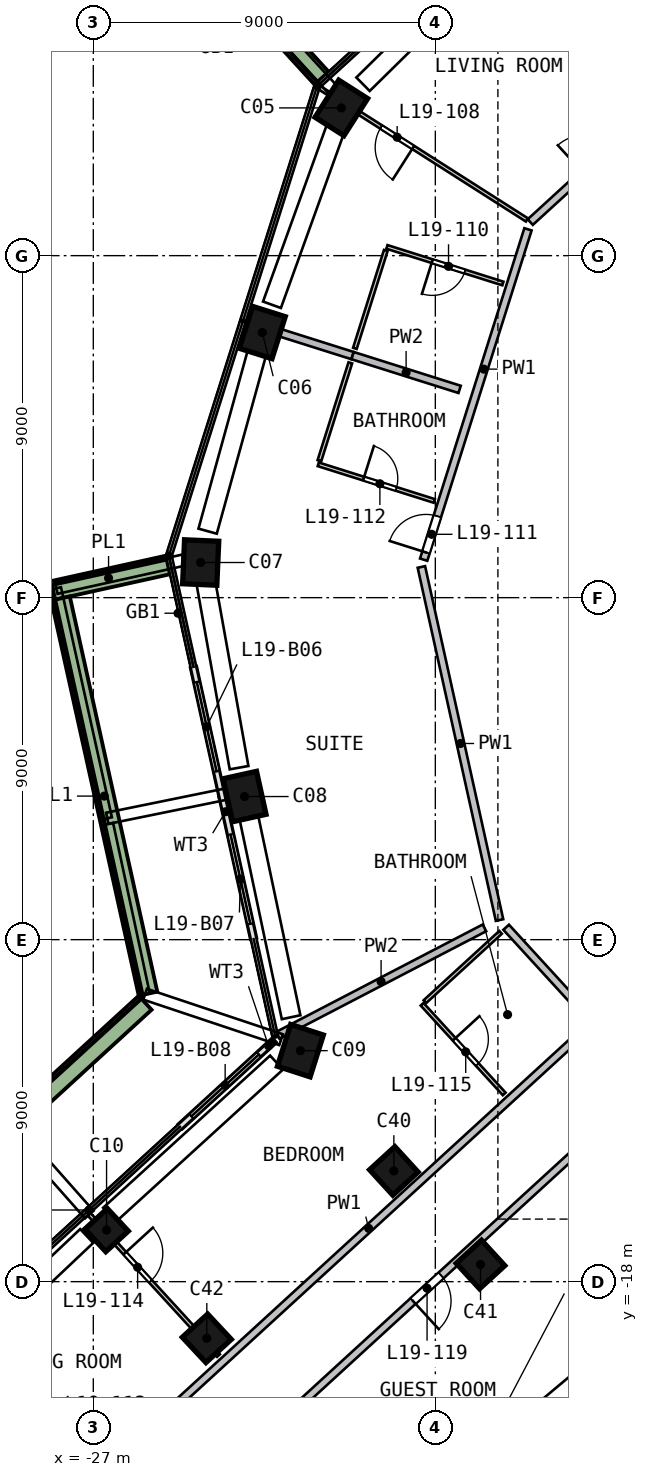
"""IFC4 building model, lengths in metres.
Left out: names, types, materials, properties, quantities, classifications, styles, units other than length and angle.
Written with IfcOpenShell. Run it as: python <this file> out.ifc"""

import sys

from ifc_helpers import new_model, si_unit, direction, frame, frame_2d, origin, origin_2d, place, context, subcontext, project, spatial, rectangle, extrude, element, fill, save


model = new_model("IFC4")
c1 = context("Model", 3, precision=1e-05, world=origin(), true_north=direction((0.0, 1.0)))
c2 = subcontext(c1, "Body", "Model", "MODEL_VIEW")
j1 = project(units=[si_unit("LENGTHUNIT", "METRE"), si_unit("PLANEANGLEUNIT", "RADIAN")], contexts=[c1])
p1 = place(None, origin())
s1 = spatial("IfcSite", under=j1, at=p1, CompositionType="ELEMENT")
p2 = place(p1, origin())
s2 = spatial("IfcBuilding", under=s1, at=p2, CompositionType="ELEMENT")
p3 = place(p2, frame((0.0, 0.0, 86.0)))
s3 = spatial("IfcBuildingStorey", under=s2, at=p3, CompositionType="ELEMENT", Elevation=86.0)
p4 = place(p3, frame((-20.399, 13.006, 0.0), z_axis=(-0.061048974, -0.097541511, 0.993357275), x_axis=(0.534139029, 0.837529173, 0.115066858)))
e1 = element("IfcColumn", 1, at=p4, inside=s3, PredefinedType="COLUMN", context=c2, shape_type="SweptSolid", body=[
    extrude(rectangle(XDim=1.15, YDim=0.9, at=origin_2d()), origin(), (0.0, 0.0, 1.0), 3.211),
])
p5 = place(p3, frame((-22.513, 7.107, 0.0), z_axis=(-0.032929748, -0.107382919, 0.99367225), x_axis=(-0.299377243, -0.947501295, -0.11231457)))
e2 = element("IfcColumn", 2, at=p5, inside=s3, PredefinedType="COLUMN", context=c2, shape_type="SweptSolid", body=[
    extrude(rectangle(XDim=1.15, YDim=0.9, at=origin_2d()), origin(), (0.0, 0.0, 1.0), 3.21),
])
p6 = place(p3, frame((-24.169, 1.064, 0.0), z_axis=(-0.004105432, -0.114952103, 0.993362552), x_axis=(0.043881327, 0.992393334, 0.115021301)))
e3 = element("IfcColumn", 3, at=p6, inside=s3, PredefinedType="COLUMN", context=c2, shape_type="SweptSolid", body=[
    extrude(rectangle(XDim=1.15, YDim=0.9, at=origin_2d()), origin(), (0.0, 0.0, 1.0), 3.211),
])
p7 = place(p3, frame((-23.051, -5.102, 0.0), z_axis=(0.025248696, -0.109436366, 0.993673078), x_axis=(0.215163997, -0.970098725, -0.112307249)))
e4 = element("IfcColumn", 4, at=p7, inside=s3, PredefinedType="COLUMN", context=c2, shape_type="SweptSolid", body=[
    extrude(rectangle(XDim=1.15, YDim=0.9, at=origin_2d()), origin(), (0.0, 0.0, 1.0), 3.21),
])
p8 = place(p3, frame((-21.62, -11.797, 0.0), z_axis=(0.056930104, -0.102306968, 0.993122474), x_axis=(0.306699912, 0.94842803, 0.080121376)))
e5 = element("IfcColumn", 5, at=p8, inside=s3, PredefinedType="COLUMN", context=c2, shape_type="SweptSolid", body=[
    extrude(rectangle(XDim=1.15, YDim=0.9, at=origin_2d()), origin(), (0.0, 0.0, 1.0), 3.212),
])
p9 = place(p3, frame((-26.812, -16.552, 0.0), z_axis=(0.133115788, -0.075331434, 0.988233455), x_axis=(-0.731940459, -0.679761124, 0.04677584)))
e6 = element("IfcColumn", 6, at=p9, inside=s3, PredefinedType="COLUMN", context=c2, shape_type="SweptSolid", body=[
    extrude(rectangle(XDim=0.8, YDim=0.8, at=origin_2d()), origin(), (0.0, 0.0, 1.0), 3.228),
])
for number, where, z_axis, x_axis in (
    (7, (-19.178, -14.976, 0.0), (0.072, -0.091, 0.993), (-0.738, -0.674, -0.008)),
    (8, (-16.912, -17.452, 0.0), (0.084, -0.08, 0.993), (-0.737, -0.676, 0.008)),
):
    element("IfcColumn", number, at=place(p3, frame(where, z_axis=z_axis, x_axis=x_axis)), inside=s3, PredefinedType="COLUMN", context=c2, shape_type="SweptSolid", body=[
        extrude(rectangle(XDim=0.9, YDim=0.9, at=origin_2d()), origin(), (0.0, 0.0, 1.0), 3.211),
    ])
p10 = place(p3, frame((-24.191, -19.415, 0.0), z_axis=(0.146355341, -0.062788481, 0.987237419), x_axis=(-0.729631569, -0.680756707, 0.064869702)))
e9 = element("IfcColumn", 9, at=p10, inside=s3, PredefinedType="COLUMN", context=c2, shape_type="SweptSolid", body=[
    extrude(rectangle(XDim=0.9, YDim=0.9, at=origin_2d()), origin(), (0.0, 0.0, 1.0), 3.231),
])
p11 = place(p3, frame((-24.363, -1.833, 0.0), z_axis=(0.0, 0.0, 1.0), x_axis=(0.216097265, -0.976371841, 0.0)))
e10 = element("IfcWall", 10, at=p11, inside=s3, PredefinedType="SOLIDWALL", context=c2, shape_type="SweptSolid", body=[
    extrude(rectangle(XDim=3.475, YDim=0.15, at=frame_2d((1.738, 0.0))), origin(), (0.0, 0.0, 1.0), 2.425),
])
p12 = place(p11, frame((0.4, 0.0, 0.0)))
e11 = element("IfcOpeningElement", 11, at=p12, cuts=e10, PredefinedType="OPENING", context=c2, shape_type="SweptSolid", body=[
    extrude(rectangle(XDim=2.4, YDim=2.4, at=frame_2d((1.2, 1.2))), frame((0.0, 0.085, 0.0), z_axis=(0.0, -1.0, 0.0), x_axis=(1.0, 0.0, 0.0)), (0.0, 0.0, 1.0), 0.17),
])
p13 = place(p3, frame((-23.612, -5.226, 0.0), z_axis=(0.0, 0.0, 1.0), x_axis=(0.216101395, -0.976370927, 0.0)))
e12 = element("IfcWall", 12, at=p13, inside=s3, PredefinedType="SOLIDWALL", context=c2, shape_type="SweptSolid", body=[
    extrude(rectangle(XDim=3.835, YDim=0.15, at=frame_2d((1.918, 0.0))), origin(), (0.0, 0.0, 1.0), 2.425),
])
p14 = place(p13, frame((1.035, 0.0, 0.0)))
e13 = element("IfcOpeningElement", 13, at=p14, cuts=e12, PredefinedType="OPENING", context=c2, shape_type="SweptSolid", body=[
    extrude(rectangle(XDim=2.4, YDim=2.4, at=frame_2d((1.2, 1.2))), frame((0.0, 0.085, 0.0), z_axis=(0.0, -1.0, 0.0), x_axis=(1.0, 0.0, 0.0)), (0.0, 0.0, 1.0), 0.17),
])
p15 = place(p3, frame((-22.281, -11.691, 0.0), z_axis=(0.0, 0.0, 1.0), x_axis=(-0.737483286, -0.675365385, 0.0)))
e14 = element("IfcWall", 14, at=p15, inside=s3, PredefinedType="SOLIDWALL", context=c2, shape_type="SweptSolid", body=[
    extrude(rectangle(XDim=3.293, YDim=0.15, at=frame_2d((1.647, 0.0))), origin(), (0.0, 0.0, 1.0), 2.425),
])
p16 = place(p15, frame((0.494, 0.0, 0.0)))
e15 = element("IfcOpeningElement", 15, at=p16, cuts=e14, PredefinedType="OPENING", context=c2, shape_type="SweptSolid", body=[
    extrude(rectangle(XDim=2.4, YDim=2.4, at=frame_2d((1.2, 1.2))), frame((0.0, 0.085, 0.0), z_axis=(0.0, -1.0, 0.0), x_axis=(1.0, 0.0, 0.0)), (0.0, 0.0, 1.0), 0.17),
])
p17 = place(p3, frame((-22.815, 15.661, 0.0), z_axis=(0.0, 0.0, 1.0), x_axis=(0.675257533, -0.737582039, 0.0)))
e16 = element("IfcWall", 16, at=p17, inside=s3, PredefinedType="SOLIDWALL", context=c2, shape_type="SweptSolid", body=[
    extrude(rectangle(XDim=2.699, YDim=0.5, at=frame_2d((1.35, 0.0))), origin(), (0.0, 0.0, 1.0), 0.7),
])
p18 = place(p3, frame((-25.037, 0.86, 0.0), z_axis=(0.0, 0.0, 1.0), x_axis=(-0.97638239, -0.216049597, 0.0)))
e17 = element("IfcWall", 17, at=p18, inside=s3, PredefinedType="SOLIDWALL", context=c2, shape_type="SweptSolid", body=[
    extrude(rectangle(XDim=3.199, YDim=0.5, at=frame_2d((1.6, 0.0))), origin(), (0.0, 0.0, 1.0), 0.7),
])
p19 = place(p3, frame((-27.862, -0.021, 0.0), z_axis=(0.0, 0.0, 1.0), x_axis=(0.216102871, -0.9763706, 0.0)))
e18 = element("IfcWall", 18, at=p19, inside=s3, PredefinedType="SOLIDWALL", context=c2, shape_type="SweptSolid", body=[
    extrude(rectangle(XDim=10.652, YDim=0.5, at=frame_2d((5.326, 0.0))), origin(), (0.0, 0.0, 1.0), 0.7),
])
p20 = place(p3, frame((-25.635, -10.661, 0.0), z_axis=(0.0, 0.0, 1.0), x_axis=(-0.737508785, -0.675337539, 0.0)))
e19 = element("IfcWall", 19, at=p20, inside=s3, PredefinedType="SOLIDWALL", context=c2, shape_type="SweptSolid", body=[
    extrude(rectangle(XDim=11.541, YDim=0.5, at=frame_2d((5.771, 0.0))), origin(), (0.0, 0.0, 1.0), 0.7),
])
p21 = place(p3, frame((-28.508, -24.613, 0.0), z_axis=(0.0, 0.0, 1.0), x_axis=(0.737515881, 0.67532979, 0.0)))
e20 = element("IfcWall", 20, at=p21, inside=s3, PredefinedType="SOLIDWALL", context=c2, shape_type="SweptSolid", body=[
    extrude(rectangle(XDim=19.689, YDim=0.2, at=frame_2d((9.844, 0.0))), origin(), (0.0, 0.0, 1.0), 3.19),
])
p22 = place(p21, frame((2.85, 0.0, 0.0)))
e21 = element("IfcOpeningElement", 21, at=p22, cuts=e20, PredefinedType="OPENING", context=c2, shape_type="SweptSolid", body=[
    extrude(rectangle(XDim=1.0, YDim=2.1, at=frame_2d((0.5, 1.05))), frame((0.0, 0.11, 0.0), z_axis=(0.0, -1.0, 0.0), x_axis=(1.0, 0.0, 0.0)), (0.0, 0.0, 1.0), 0.22),
])
p23 = place(p3, frame((-12.502, -12.939, 0.0), z_axis=(0.0, 0.0, 1.0), x_axis=(-0.737510226, -0.675335966, 0.0)))
e22 = element("IfcWall", 22, at=p23, inside=s3, PredefinedType="SOLIDWALL", context=c2, shape_type="SweptSolid", body=[
    extrude(rectangle(XDim=19.688, YDim=0.2, at=frame_2d((9.844, 0.0))), origin(), (0.0, 0.0, 1.0), 3.19),
])
p24 = place(p23, frame((7.25, 0.0, 0.0)))
e23 = element("IfcOpeningElement", 23, at=p24, cuts=e22, PredefinedType="OPENING", context=c2, shape_type="SweptSolid", body=[
    extrude(rectangle(XDim=1.0, YDim=2.1, at=frame_2d((0.5, 1.05))), frame((0.0, 0.11, 0.0), z_axis=(0.0, -1.0, 0.0), x_axis=(1.0, 0.0, 0.0)), (0.0, 0.0, 1.0), 0.22),
])
p25 = place(p3, frame((-18.367, 0.808, 0.0), z_axis=(0.0, 0.0, 1.0), x_axis=(0.216096423, -0.976372027, 0.0)))
e24 = element("IfcWall", 24, at=p25, inside=s3, PredefinedType="SOLIDWALL", context=c2, shape_type="SweptSolid", body=[
    extrude(rectangle(XDim=9.516, YDim=0.2, at=frame_2d((4.758, 0.0))), origin(), (0.0, 0.0, 1.0), 3.19),
])
p26 = place(p3, frame((-18.307, 1.0, 0.0), z_axis=(0.0, 0.0, 1.0), x_axis=(0.301042929, 0.953610589, 0.0)))
e25 = element("IfcWall", 25, at=p26, inside=s3, PredefinedType="SOLIDWALL", context=c2, shape_type="SweptSolid", body=[
    extrude(rectangle(XDim=9.116, YDim=0.2, at=frame_2d((4.558, 0.0))), origin(), (0.0, 0.0, 1.0), 3.19),
])
p27 = place(p26, frame((0.2, 0.0, 0.0)))
e26 = element("IfcOpeningElement", 26, at=p27, cuts=e25, PredefinedType="OPENING", context=c2, shape_type="SweptSolid", body=[
    extrude(rectangle(XDim=1.0, YDim=2.1, at=frame_2d((0.5, 1.05))), frame((0.0, 0.11, 0.0), z_axis=(0.0, -1.0, 0.0), x_axis=(1.0, 0.0, 0.0)), (0.0, 0.0, 1.0), 0.22),
])
p28 = place(p3, frame((-16.136, -8.674, 0.0), z_axis=(0.0, 0.0, 1.0), x_axis=(0.675366857, -0.737481938, 0.0)))
e27 = element("IfcWall", 27, at=p28, inside=s3, PredefinedType="SOLIDWALL", context=c2, shape_type="SweptSolid", body=[
    extrude(rectangle(XDim=3.4, YDim=0.2, at=frame_2d((1.7, 0.0))), origin(), (0.0, 0.0, 1.0), 3.19),
])
p29 = place(p3, frame((-15.502, 9.884, 0.0), z_axis=(0.0, 0.0, 1.0), x_axis=(0.73751517, 0.675330566, 0.0)))
e28 = element("IfcWall", 28, at=p29, inside=s3, PredefinedType="SOLIDWALL", context=c2, shape_type="SweptSolid", body=[
    extrude(rectangle(XDim=9.317, YDim=0.2, at=frame_2d((4.658, 0.0))), origin(), (0.0, 0.0, 1.0), 3.19),
])
p30 = place(p29, frame((1.9, 0.0, 0.0)))
e29 = element("IfcOpeningElement", 29, at=p30, cuts=e28, PredefinedType="OPENING", context=c2, shape_type="SweptSolid", body=[
    extrude(rectangle(XDim=1.0, YDim=2.1, at=frame_2d((0.5, 1.05))), frame((0.0, 0.11, 0.0), z_axis=(0.0, -1.0, 0.0), x_axis=(1.0, 0.0, 0.0)), (0.0, 0.0, 1.0), 0.22),
])
p31 = place(p3, frame((-20.177, 6.369, 0.0), z_axis=(0.0, 0.0, 1.0), x_axis=(-0.953602675, 0.301067997, 0.0)))
e30 = element("IfcWall", 30, at=p31, inside=s3, PredefinedType="SOLIDWALL", context=c2, shape_type="SweptSolid", body=[
    extrude(rectangle(XDim=2.95, YDim=0.2, at=frame_2d((1.475, 0.0))), origin(), (0.0, 0.0, 1.0), 3.19),
])
p32 = place(p3, frame((-16.707, -8.69, 0.0), z_axis=(0.0, 0.0, 1.0), x_axis=(-0.887170515, -0.461441739, 0.0)))
e31 = element("IfcWall", 31, at=p32, inside=s3, PredefinedType="SOLIDWALL", context=c2, shape_type="SweptSolid", body=[
    extrude(rectangle(XDim=6.132, YDim=0.2, at=frame_2d((3.066, 0.0))), origin(), (0.0, 0.0, 1.0), 3.19),
])
p33 = place(p3, frame((-17.361, 5.481, 0.0), z_axis=(0.0, 0.0, 1.0), x_axis=(-0.953630141, 0.300980986, 0.0)))
e32 = element("IfcWall", 32, at=p33, inside=s3, PredefinedType="SOLIDWALL", context=c2, shape_type="SweptSolid", body=[
    extrude(rectangle(XDim=2.953, YDim=0.2, at=frame_2d((1.476, 0.0))), origin(), (0.0, 0.0, 1.0), 3.19),
])
p34 = place(p3, frame((-27.116, -16.22, 0.0), z_axis=(0.0, 0.0, 1.0), x_axis=(0.675363337, -0.737485161, 0.0)))
e33 = element("IfcWall", 33, at=p34, inside=s3, PredefinedType="PARTITIONING", context=c2, shape_type="SweptSolid", body=[
    extrude(rectangle(XDim=5.05, YDim=0.1, at=frame_2d((2.525, 0.0))), origin(), (0.0, 0.0, 1.0), 3.19),
])
p35 = place(p34, frame((1.4, 0.0, 0.0)))
e34 = element("IfcOpeningElement", 34, at=p35, cuts=e33, PredefinedType="OPENING", context=c2, shape_type="SweptSolid", body=[
    extrude(rectangle(XDim=1.0, YDim=2.1, at=frame_2d((0.5, 1.05))), frame((0.0, 0.06, 0.0), z_axis=(0.0, -1.0, 0.0), x_axis=(1.0, 0.0, 0.0)), (0.0, 0.0, 1.0), 0.12),
])
for number, where, z_axis, x_axis in (
    (35, (-21.05, 3.604, 0.0), (0.0, 0.0, 1.0), (0.301, 0.954, 0.0)),
    (36, (-19.304, 9.135, 0.0), (0.0, 0.0, 1.0), (-0.301, -0.954, 0.0)),
):
    element("IfcWall", number, at=place(p3, frame(where, z_axis=z_axis, x_axis=x_axis)), inside=s3, PredefinedType="PARTITIONING", context=c2, shape_type="SweptSolid", body=[
        extrude(rectangle(XDim=2.7, YDim=0.1, at=frame_2d((1.35, 0.0))), origin(), (0.0, 0.0, 1.0), 3.19),
    ])
p36 = place(p3, frame((-21.08, 3.509, 0.0), z_axis=(0.0, 0.0, 1.0), x_axis=(0.953634536, -0.30096706, 0.0)))
e37 = element("IfcWall", 37, at=p36, inside=s3, PredefinedType="PARTITIONING", context=c2, shape_type="SweptSolid", body=[
    extrude(rectangle(XDim=3.2, YDim=0.1, at=frame_2d((1.6, 0.0))), origin(), (0.0, 0.0, 1.0), 3.19),
])
p37 = place(p36, frame((1.25, 0.0, 0.0)))
e38 = element("IfcOpeningElement", 38, at=p37, cuts=e37, PredefinedType="OPENING", context=c2, shape_type="SweptSolid", body=[
    extrude(rectangle(XDim=0.9, YDim=2.1, at=frame_2d((0.45, 1.05))), frame((0.0, 0.06, 0.0), z_axis=(0.0, -1.0, 0.0), x_axis=(1.0, 0.0, 0.0)), (0.0, 0.0, 1.0), 0.12),
])
p38 = place(p3, frame((-15.589, 9.939, 0.0), z_axis=(0.0, 0.0, 1.0), x_axis=(-0.843215663, 0.537575433, 0.0)))
e39 = element("IfcWall", 39, at=p38, inside=s3, PredefinedType="PARTITIONING", context=c2, shape_type="SweptSolid", body=[
    extrude(rectangle(XDim=6.476, YDim=0.1, at=frame_2d((3.238, 0.0))), origin(), (0.0, 0.0, 1.0), 3.19),
])
p39 = place(p38, frame((3.55, 0.0, 0.0)))
e40 = element("IfcOpeningElement", 40, at=p39, cuts=e39, PredefinedType="OPENING", context=c2, shape_type="SweptSolid", body=[
    extrude(rectangle(XDim=1.0, YDim=2.1, at=frame_2d((0.5, 1.05))), frame((0.0, 0.06, 0.0), z_axis=(0.0, -1.0, 0.0), x_axis=(1.0, 0.0, 0.0)), (0.0, 0.0, 1.0), 0.12),
])
p40 = place(p3, frame((-16.222, 8.267, 0.0), z_axis=(0.0, 0.0, 1.0), x_axis=(-0.953627625, 0.300988958, 0.0)))
e41 = element("IfcWall", 41, at=p40, inside=s3, PredefinedType="PARTITIONING", context=c2, shape_type="SweptSolid", body=[
    extrude(rectangle(XDim=3.2, YDim=0.1, at=frame_2d((1.6, 0.0))), origin(), (0.0, 0.0, 1.0), 3.19),
])
p41 = place(p40, frame((1.05, 0.0, 0.0)))
e42 = element("IfcOpeningElement", 42, at=p41, cuts=e41, PredefinedType="OPENING", context=c2, shape_type="SweptSolid", body=[
    extrude(rectangle(XDim=0.9, YDim=2.1, at=frame_2d((0.45, 1.05))), frame((0.0, 0.06, 0.0), z_axis=(0.0, -1.0, 0.0), x_axis=(1.0, 0.0, 0.0)), (0.0, 0.0, 1.0), 0.12),
])
p42 = place(p3, frame((-16.283, -8.809, 0.0), z_axis=(0.0, 0.0, 1.0), x_axis=(-0.737570623, -0.675270003, 0.0)))
e43 = element("IfcWall", 43, at=p42, inside=s3, PredefinedType="PARTITIONING", context=c2, shape_type="SweptSolid", body=[
    extrude(rectangle(XDim=2.7, YDim=0.1, at=frame_2d((1.35, 0.0))), origin(), (0.0, 0.0, 1.0), 3.19),
])
p43 = place(p3, frame((-18.348, -10.7, 0.0), z_axis=(0.0, 0.0, 1.0), x_axis=(0.67529265, -0.737549887, 0.0)))
e44 = element("IfcWall", 44, at=p43, inside=s3, PredefinedType="PARTITIONING", context=c2, shape_type="SweptSolid", body=[
    extrude(rectangle(XDim=3.2, YDim=0.1, at=frame_2d((1.6, 0.0))), origin(), (0.0, 0.0, 1.0), 3.19),
])
p44 = place(p43, frame((1.25, 0.0, 0.0)))
e45 = element("IfcOpeningElement", 45, at=p44, cuts=e44, PredefinedType="OPENING", context=c2, shape_type="SweptSolid", body=[
    extrude(rectangle(XDim=0.9, YDim=2.1, at=frame_2d((0.45, 1.05))), frame((0.0, 0.06, 0.0), z_axis=(0.0, -1.0, 0.0), x_axis=(1.0, 0.0, 0.0)), (0.0, 0.0, 1.0), 0.12),
])
p45 = place(p3, frame((-16.281, 17.78, 0.0), z_axis=(0.0, 0.0, 1.0), x_axis=(0.67532007, -0.737524781, 0.0)))
e46 = element("IfcWall", 46, at=p45, inside=s3, PredefinedType="PARTITIONING", context=c2, shape_type="SweptSolid", body=[
    extrude(rectangle(XDim=6.15, YDim=0.1, at=frame_2d((3.075, 0.0))), origin(), (0.0, 0.0, 1.0), 3.19),
])
p46 = place(p45, frame((1.8, 0.0, 0.0)))
e47 = element("IfcOpeningElement", 47, at=p46, cuts=e46, PredefinedType="OPENING", context=c2, shape_type="SweptSolid", body=[
    extrude(rectangle(XDim=1.0, YDim=2.1, at=frame_2d((0.5, 1.05))), frame((0.0, 0.06, 0.0), z_axis=(0.0, -1.0, 0.0), x_axis=(1.0, 0.0, 0.0)), (0.0, 0.0, 1.0), 0.12),
])
p47 = place(p12, origin())
e48 = element("IfcDoor", 48, at=p47, inside=s3, OperationType="SLIDING_TO_RIGHT", PredefinedType="DOOR", context=c2, shape_type="SweptSolid", body=[
    extrude(rectangle(XDim=2.4, YDim=2.4, at=frame_2d((1.2, 1.2))), frame((0.0, 0.025, 0.0), z_axis=(0.0, -1.0, 0.0), x_axis=(1.0, 0.0, 0.0)), (0.0, 0.0, 1.0), 0.05),
])
fill(e11, e48)
p48 = place(p14, origin())
e49 = element("IfcDoor", 49, at=p48, inside=s3, OperationType="SLIDING_TO_LEFT", PredefinedType="DOOR", context=c2, shape_type="SweptSolid", body=[
    extrude(rectangle(XDim=2.4, YDim=2.4, at=frame_2d((1.2, 1.2))), frame((0.0, 0.025, 0.0), z_axis=(0.0, -1.0, 0.0), x_axis=(1.0, 0.0, 0.0)), (0.0, 0.0, 1.0), 0.05),
])
fill(e13, e49)
p49 = place(p16, origin())
e50 = element("IfcDoor", 50, at=p49, inside=s3, OperationType="SLIDING_TO_LEFT", PredefinedType="DOOR", context=c2, shape_type="SweptSolid", body=[
    extrude(rectangle(XDim=2.4, YDim=2.4, at=frame_2d((1.2, 1.2))), frame((0.0, 0.025, 0.0), z_axis=(0.0, -1.0, 0.0), x_axis=(1.0, 0.0, 0.0)), (0.0, 0.0, 1.0), 0.05),
])
fill(e15, e50)
p50 = place(p39, origin())
e51 = element("IfcDoor", 51, at=p50, inside=s3, OperationType="SINGLE_SWING_LEFT", PredefinedType="DOOR", context=c2, shape_type="SweptSolid", body=[
    extrude(rectangle(XDim=1.0, YDim=2.1, at=frame_2d((0.5, 1.05))), frame((0.0, 0.025, 0.0), z_axis=(0.0, -1.0, 0.0), x_axis=(1.0, 0.0, 0.0)), (0.0, 0.0, 1.0), 0.05),
])
fill(e40, e51)
p51 = place(p41, origin())
e52 = element("IfcDoor", 52, at=p51, inside=s3, OperationType="SINGLE_SWING_RIGHT", PredefinedType="DOOR", context=c2, shape_type="SweptSolid", body=[
    extrude(rectangle(XDim=0.9, YDim=2.1, at=frame_2d((0.45, 1.05))), frame((0.0, 0.025, 0.0), z_axis=(0.0, -1.0, 0.0), x_axis=(1.0, 0.0, 0.0)), (0.0, 0.0, 1.0), 0.05),
])
fill(e42, e52)
p52 = place(p27, origin())
e53 = element("IfcDoor", 53, at=p52, inside=s3, OperationType="SINGLE_SWING_LEFT", PredefinedType="DOOR", context=c2, shape_type="SweptSolid", body=[
    extrude(rectangle(XDim=1.0, YDim=2.1, at=frame_2d((0.5, 1.05))), frame((0.0, 0.025, 0.0), z_axis=(0.0, -1.0, 0.0), x_axis=(1.0, 0.0, 0.0)), (0.0, 0.0, 1.0), 0.05),
])
fill(e26, e53)
p53 = place(p37, origin())
e54 = element("IfcDoor", 54, at=p53, inside=s3, OperationType="SINGLE_SWING_LEFT", PredefinedType="DOOR", context=c2, shape_type="SweptSolid", body=[
    extrude(rectangle(XDim=0.9, YDim=2.1, at=frame_2d((0.45, 1.05))), frame((0.0, 0.025, 0.0), z_axis=(0.0, -1.0, 0.0), x_axis=(1.0, 0.0, 0.0)), (0.0, 0.0, 1.0), 0.05),
])
fill(e38, e54)
p54 = place(p35, origin())
e55 = element("IfcDoor", 55, at=p54, inside=s3, OperationType="SINGLE_SWING_LEFT", PredefinedType="DOOR", context=c2, shape_type="SweptSolid", body=[
    extrude(rectangle(XDim=1.0, YDim=2.1, at=frame_2d((0.5, 1.05))), frame((0.0, 0.025, 0.0), z_axis=(0.0, -1.0, 0.0), x_axis=(1.0, 0.0, 0.0)), (0.0, 0.0, 1.0), 0.05),
])
fill(e34, e55)
p55 = place(p44, origin())
e56 = element("IfcDoor", 56, at=p55, inside=s3, OperationType="SINGLE_SWING_LEFT", PredefinedType="DOOR", context=c2, shape_type="SweptSolid", body=[
    extrude(rectangle(XDim=0.9, YDim=2.1, at=frame_2d((0.45, 1.05))), frame((0.0, 0.025, 0.0), z_axis=(0.0, -1.0, 0.0), x_axis=(1.0, 0.0, 0.0)), (0.0, 0.0, 1.0), 0.05),
])
fill(e45, e56)
p56 = place(p24, origin())
e57 = element("IfcDoor", 57, at=p56, inside=s3, OperationType="SINGLE_SWING_RIGHT", PredefinedType="DOOR", context=c2, shape_type="SweptSolid", body=[
    extrude(rectangle(XDim=1.0, YDim=2.1, at=frame_2d((0.5, 1.05))), frame((0.0, 0.025, 0.0), z_axis=(0.0, -1.0, 0.0), x_axis=(1.0, 0.0, 0.0)), (0.0, 0.0, 1.0), 0.05),
])
fill(e23, e57)
save(model, sys.argv[1])
